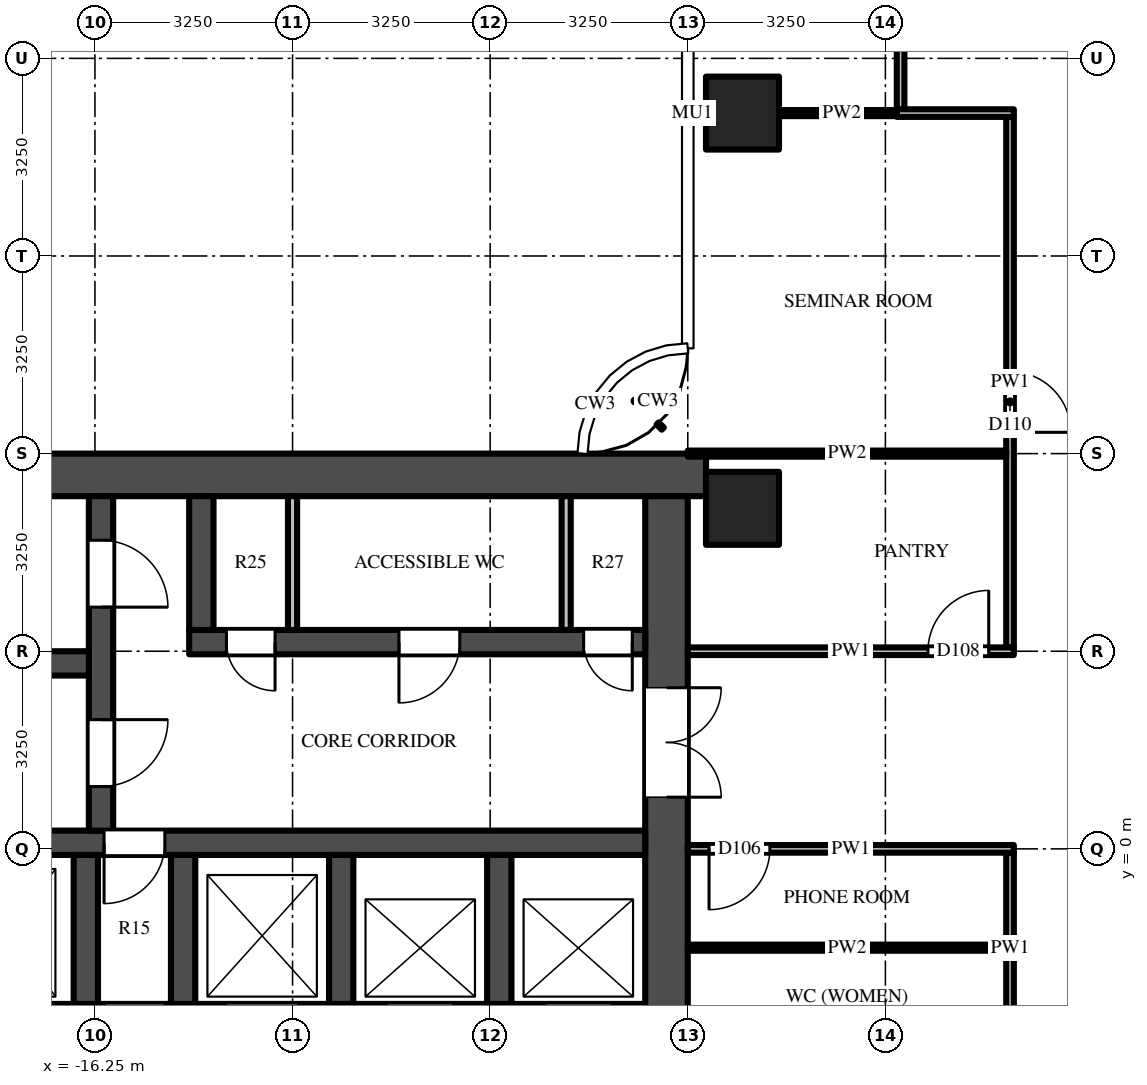
"""IFC4 building model, lengths in metres.
Left out: names, types, materials, properties, quantities, classifications, styles, units other than length and angle.
Written with IfcOpenShell. Run it as: python <this file> out.ifc"""

import sys

from ifc_helpers import new_model, si_unit, direction, frame, frame_2d, origin, origin_2d, place, context, subcontext, project, spatial, rectangle, extrude, source, transform, mapped, element, fill, save


model = new_model("IFC4")
c1 = context("Model", 3, precision=1e-05, world=origin(), true_north=direction((0.0, 1.0)))
c2 = subcontext(c1, "Body", "Model", "MODEL_VIEW")
j1 = project(units=[si_unit("LENGTHUNIT", "METRE"), si_unit("PLANEANGLEUNIT", "RADIAN")], contexts=[c1])
p1 = place(None, origin())
s1 = spatial("IfcSite", under=j1, at=p1, CompositionType="ELEMENT")
p2 = place(p1, origin())
s2 = spatial("IfcBuilding", under=s1, at=p2, CompositionType="ELEMENT")
p3 = place(p2, frame((0.0, 0.0, 204.9)))
s3 = spatial("IfcBuildingStorey", under=s2, at=p3, CompositionType="ELEMENT", Elevation=204.9)
m1 = source(origin(), c2, "Body", "SweptSolid", [
    extrude(rectangle(XDim=1.2, YDim=1.2, at=origin_2d()), origin(), (0.0, 0.0, 1.0), 3.9),
])
for number, where, z_axis, x_axis in (
    (1, (-5.6, 12.1, 0.0), (0.0, 0.0, 1.0), (1.0, 0.0, 0.0)),
    (2, (-5.6, 5.6, 0.0), (0.0, 0.0, 1.0), (1.0, 0.0, 0.0)),
):
    element("IfcColumn", number, at=place(p3, frame(where, z_axis=z_axis, x_axis=x_axis)), inside=s3, PredefinedType="COLUMN", context=c2, shape_type="MappedRepresentation", body=[
        mapped(m1, transform((0.0, 0.0, 0.0))),
    ])
m2 = source(origin(), c2, "Body", "SweptSolid", [
    extrude(rectangle(XDim=16.55, YDim=0.7, at=frame_2d((8.275, 0.0))), origin(), (0.0, 0.0, 1.0), 3.7),
])
p4 = place(p3, frame((-6.2, 6.15, 0.0), z_axis=(0.0, 0.0, 1.0), x_axis=(-1.0, 0.0, 0.0)))
e3 = element("IfcWall", 3, at=p4, inside=s3, PredefinedType="SHEAR", context=c2, shape_type="MappedRepresentation", body=[
    mapped(m2, transform((0.0, 0.0, 0.0))),
])
m3 = source(origin(), c2, "Body", "SweptSolid", [
    extrude(rectangle(XDim=14.85, YDim=0.7, at=frame_2d((7.425, 0.0))), origin(), (0.0, 0.0, 1.0), 3.7),
])
p5 = place(p3, frame((-7.2, -2.9, 0.0), z_axis=(0.0, 0.0, 1.0), x_axis=(-1.0, 0.0, 0.0)))
e4 = element("IfcWall", 4, at=p5, inside=s3, PredefinedType="SHEAR", context=c2, shape_type="MappedRepresentation", body=[
    mapped(m3, transform((0.0, 0.0, 0.0))),
])
m4 = source(origin(), c2, "Body", "SweptSolid", [
    extrude(rectangle(XDim=1.1, YDim=2.1, at=frame_2d((0.55, 1.05))), frame((0.0, 0.36, 0.0), z_axis=(0.0, -1.0, 0.0), x_axis=(1.0, 0.0, 0.0)), (0.0, 0.0, 1.0), 0.72),
])
p6 = place(p5, frame((0.55, 0.0, 0.0)))
e5 = element("IfcOpeningElement", 5, at=p6, cuts=e4, PredefinedType="OPENING", context=c2, shape_type="MappedRepresentation", body=[
    mapped(m4, transform((0.0, 0.0, 0.0))),
])
p7 = place(p5, frame((3.15, 0.0, 0.0)))
e6 = element("IfcOpeningElement", 6, at=p7, cuts=e4, PredefinedType="OPENING", context=c2, shape_type="MappedRepresentation", body=[
    mapped(m4, transform((0.0, 0.0, 0.0))),
])
m5 = source(origin(), c2, "Body", "SweptSolid", [
    extrude(rectangle(XDim=1.2, YDim=2.1, at=frame_2d((0.6, 1.05))), frame((0.0, 0.36, 0.0), z_axis=(0.0, -1.0, 0.0), x_axis=(1.0, 0.0, 0.0)), (0.0, 0.0, 1.0), 0.72),
])
p8 = place(p5, frame((5.7, 0.0, 0.0)))
e7 = element("IfcOpeningElement", 7, at=p8, cuts=e4, PredefinedType="OPENING", context=c2, shape_type="MappedRepresentation", body=[
    mapped(m5, transform((0.0, 0.0, 0.0))),
])
m6 = source(origin(), c2, "Body", "SweptSolid", [
    extrude(rectangle(XDim=1.3, YDim=2.1, at=frame_2d((0.65, 1.05))), frame((0.0, 0.36, 0.0), z_axis=(0.0, -1.0, 0.0), x_axis=(1.0, 0.0, 0.0)), (0.0, 0.0, 1.0), 0.72),
])
p9 = place(p5, frame((12.2, 0.0, 0.0)))
e8 = element("IfcOpeningElement", 8, at=p9, cuts=e4, PredefinedType="OPENING", context=c2, shape_type="MappedRepresentation", body=[
    mapped(m6, transform((0.0, 0.0, 0.0))),
])
p10 = place(p5, frame((9.85, 0.0, 0.0)))
e9 = element("IfcOpeningElement", 9, at=p10, cuts=e4, PredefinedType="OPENING", context=c2, shape_type="MappedRepresentation", body=[
    mapped(m5, transform((0.0, 0.0, 0.0))),
])
m7 = source(origin(), c2, "Body", "SweptSolid", [
    extrude(rectangle(XDim=1.0, YDim=2.1, at=frame_2d((0.5, 1.05))), frame((0.0, 0.36, 0.0), z_axis=(0.0, -1.0, 0.0), x_axis=(1.0, 0.0, 0.0)), (0.0, 0.0, 1.0), 0.72),
])
p11 = place(p5, frame((7.9, 0.0, 0.0)))
e10 = element("IfcOpeningElement", 10, at=p11, cuts=e4, PredefinedType="OPENING", context=c2, shape_type="MappedRepresentation", body=[
    mapped(m7, transform((0.0, 0.0, 0.0))),
])
m8 = source(origin(), c2, "Body", "SweptSolid", [
    extrude(rectangle(XDim=9.05, YDim=0.7, at=frame_2d((4.525, 0.0))), origin(), (0.0, 0.0, 1.0), 3.7),
])
p12 = place(p3, frame((-6.85, 5.8, 0.0), z_axis=(0.0, 0.0, 1.0), x_axis=(0.0, -1.0, 0.0)))
e11 = element("IfcWall", 11, at=p12, inside=s3, PredefinedType="SHEAR", context=c2, shape_type="MappedRepresentation", body=[
    mapped(m8, transform((0.0, 0.0, 0.0))),
])
m9 = source(origin(), c2, "Body", "SweptSolid", [
    extrude(rectangle(XDim=1.8, YDim=2.1, at=frame_2d((0.9, 1.05))), frame((0.0, 0.36, 0.0), z_axis=(0.0, -1.0, 0.0), x_axis=(1.0, 0.0, 0.0)), (0.0, 0.0, 1.0), 0.72),
])
p13 = place(p12, frame((3.15, 0.0, 0.0)))
e12 = element("IfcOpeningElement", 12, at=p13, cuts=e11, PredefinedType="OPENING", context=c2, shape_type="MappedRepresentation", body=[
    mapped(m9, transform((0.0, 0.0, 0.0))),
])
m10 = source(origin(), c2, "Body", "SweptSolid", [
    extrude(rectangle(XDim=7.5, YDim=0.4, at=frame_2d((3.75, 0.0))), origin(), (0.0, 0.0, 1.0), 3.7),
])
p14 = place(p3, frame((-7.2, 3.4, 0.0), z_axis=(0.0, 0.0, 1.0), x_axis=(-1.0, 0.0, 0.0)))
e13 = element("IfcWall", 13, at=p14, inside=s3, PredefinedType="SHEAR", context=c2, shape_type="MappedRepresentation", body=[
    mapped(m10, transform((0.0, 0.0, 0.0))),
])
m11 = source(origin(), c2, "Body", "SweptSolid", [
    extrude(rectangle(XDim=0.8, YDim=2.1, at=frame_2d((0.4, 1.05))), frame((0.0, 0.21, 0.0), z_axis=(0.0, -1.0, 0.0), x_axis=(1.0, 0.0, 0.0)), (0.0, 0.0, 1.0), 0.42),
])
p15 = place(p14, frame((0.212, 0.0, 0.0)))
e14 = element("IfcOpeningElement", 14, at=p15, cuts=e13, PredefinedType="OPENING", context=c2, shape_type="MappedRepresentation", body=[
    mapped(m11, transform((0.0, 0.0, 0.0))),
])
m12 = source(origin(), c2, "Body", "SweptSolid", [
    extrude(rectangle(XDim=1.0, YDim=2.1, at=frame_2d((0.5, 1.05))), frame((0.0, 0.21, 0.0), z_axis=(0.0, -1.0, 0.0), x_axis=(1.0, 0.0, 0.0)), (0.0, 0.0, 1.0), 0.42),
])
p16 = place(p14, frame((3.05, 0.0, 0.0)))
e15 = element("IfcOpeningElement", 15, at=p16, cuts=e13, PredefinedType="OPENING", context=c2, shape_type="MappedRepresentation", body=[
    mapped(m12, transform((0.0, 0.0, 0.0))),
])
p17 = place(p14, frame((6.087, 0.0, 0.0)))
e16 = element("IfcOpeningElement", 16, at=p17, cuts=e13, PredefinedType="OPENING", context=c2, shape_type="MappedRepresentation", body=[
    mapped(m11, transform((0.0, 0.0, 0.0))),
])
m13 = source(origin(), c2, "Body", "SweptSolid", [
    extrude(rectangle(XDim=14.85, YDim=0.4, at=frame_2d((7.425, 0.0))), origin(), (0.0, 0.0, 1.0), 3.7),
])
p18 = place(p3, frame((-7.2, 0.1, 0.0), z_axis=(0.0, 0.0, 1.0), x_axis=(-1.0, 0.0, 0.0)))
e17 = element("IfcWall", 17, at=p18, inside=s3, PredefinedType="SHEAR", context=c2, shape_type="MappedRepresentation", body=[
    mapped(m13, transform((0.0, 0.0, 0.0))),
])
p19 = place(p18, frame((7.9, 0.0, 0.0)))
e18 = element("IfcOpeningElement", 18, at=p19, cuts=e17, PredefinedType="OPENING", context=c2, shape_type="MappedRepresentation", body=[
    mapped(m12, transform((0.0, 0.0, 0.0))),
])
m14 = source(origin(), c2, "Body", "SweptSolid", [
    extrude(rectangle(XDim=5.5, YDim=0.4, at=frame_2d((2.75, 0.0))), origin(), (0.0, 0.0, 1.0), 3.7),
])
p20 = place(p3, frame((-16.15, 5.8, 0.0), z_axis=(0.0, 0.0, 1.0), x_axis=(0.0, -1.0, 0.0)))
e19 = element("IfcWall", 19, at=p20, inside=s3, PredefinedType="SHEAR", context=c2, shape_type="MappedRepresentation", body=[
    mapped(m14, transform((0.0, 0.0, 0.0))),
])
m15 = source(origin(), c2, "Body", "SweptSolid", [
    extrude(rectangle(XDim=1.1, YDim=2.1, at=frame_2d((0.55, 1.05))), frame((0.0, 0.21, 0.0), z_axis=(0.0, -1.0, 0.0), x_axis=(1.0, 0.0, 0.0)), (0.0, 0.0, 1.0), 0.42),
])
p21 = place(p20, frame((0.725, 0.0, 0.0)))
e20 = element("IfcOpeningElement", 20, at=p21, cuts=e19, PredefinedType="OPENING", context=c2, shape_type="MappedRepresentation", body=[
    mapped(m15, transform((0.0, 0.0, 0.0))),
])
p22 = place(p20, frame((3.675, 0.0, 0.0)))
e21 = element("IfcOpeningElement", 21, at=p22, cuts=e19, PredefinedType="OPENING", context=c2, shape_type="MappedRepresentation", body=[
    mapped(m15, transform((0.0, 0.0, 0.0))),
])
m16 = source(origin(), c2, "Body", "SweptSolid", [
    extrude(rectangle(XDim=5.7, YDim=0.4, at=frame_2d((2.85, 0.0))), origin(), (0.0, 0.0, 1.0), 3.7),
])
p23 = place(p3, frame((-16.35, 3.05, 0.0), z_axis=(0.0, 0.0, 1.0), x_axis=(-1.0, 0.0, 0.0)))
e22 = element("IfcWall", 22, at=p23, inside=s3, PredefinedType="SHEAR", context=c2, shape_type="MappedRepresentation", body=[
    mapped(m16, transform((0.0, 0.0, 0.0))),
])
m17 = source(origin(), c2, "Body", "SweptSolid", [
    extrude(rectangle(XDim=2.2, YDim=0.4, at=frame_2d((1.1, 0.0))), origin(), (0.0, 0.0, 1.0), 3.7),
])
p24 = place(p3, frame((-14.5, 5.8, 0.0), z_axis=(0.0, 0.0, 1.0), x_axis=(0.0, -1.0, 0.0)))
e23 = element("IfcWall", 23, at=p24, inside=s3, PredefinedType="SHEAR", context=c2, shape_type="MappedRepresentation", body=[
    mapped(m17, transform((0.0, 0.0, 0.0))),
])
m18 = source(origin(), c2, "Body", "SweptSolid", [
    extrude(rectangle(XDim=2.45, YDim=0.4, at=frame_2d((1.225, 0.0))), origin(), (0.0, 0.0, 1.0), 3.7),
])
for number, where, z_axis, x_axis in (
    (24, (-9.6, -0.1, 0.0), (0.0, 0.0, 1.0), (0.0, -1.0, 0.0)),
    (25, (-12.2, -0.1, 0.0), (0.0, 0.0, 1.0), (0.0, -1.0, 0.0)),
    (26, (-14.8, -0.1, 0.0), (0.0, 0.0, 1.0), (0.0, -1.0, 0.0)),
    (27, (-16.4, -0.1, 0.0), (0.0, 0.0, 1.0), (0.0, -1.0, 0.0)),
):
    element("IfcWall", number, at=place(p3, frame(where, z_axis=z_axis, x_axis=x_axis)), inside=s3, PredefinedType="SHEAR", context=c2, shape_type="MappedRepresentation", body=[
        mapped(m18, transform((0.0, 0.0, 0.0))),
    ])
m19 = source(origin(), c2, "Body", "SweptSolid", [
    extrude(rectangle(XDim=2.2, YDim=0.15, at=frame_2d((1.1, 0.0))), origin(), (0.0, 0.0, 1.0), 3.7),
])
for number, where, z_axis, x_axis in (
    (28, (-8.5, 5.8, 0.0), (0.0, 0.0, 1.0), (0.0, -1.0, 0.0)),
    (29, (-13.0, 5.8, 0.0), (0.0, 0.0, 1.0), (0.0, -1.0, 0.0)),
):
    element("IfcWall", number, at=place(p3, frame(where, z_axis=z_axis, x_axis=x_axis)), inside=s3, PredefinedType="PARTITIONING", context=c2, shape_type="MappedRepresentation", body=[
        mapped(m19, transform((0.0, 0.0, 0.0))),
    ])
m20 = source(origin(), c2, "Body", "SweptSolid", [
    extrude(rectangle(XDim=8.788, YDim=0.125, at=frame_2d((4.394, 0.0))), origin(), (0.0, 0.0, 1.0), 2.78),
])
p25 = place(p3, frame((-3.0, 12.15, 0.0), z_axis=(0.0, 0.0, 1.0), x_axis=(0.0, 1.0, 0.0)))
e30 = element("IfcWall", 30, at=p25, inside=s3, PredefinedType="PARTITIONING", context=c2, shape_type="MappedRepresentation", body=[
    mapped(m20, transform((0.0, 0.0, 0.0))),
])
m21 = source(origin(), c2, "Body", "SweptSolid", [
    extrude(rectangle(XDim=1.8, YDim=2.1, at=frame_2d((0.9, 1.05))), frame((0.0, 0.073, 0.0), z_axis=(0.0, -1.0, 0.0), x_axis=(1.0, 0.0, 0.0)), (0.0, 0.0, 1.0), 0.145),
])
p26 = place(p25, frame((5.2, 0.0, 0.0)))
e31 = element("IfcOpeningElement", 31, at=p26, cuts=e30, PredefinedType="OPENING", context=c2, shape_type="MappedRepresentation", body=[
    mapped(m21, transform((0.0, 0.0, 0.0))),
])
m22 = source(origin(), c2, "Body", "SweptSolid", [
    extrude(rectangle(XDim=3.125, YDim=0.125, at=frame_2d((1.562, 0.0))), origin(), (0.0, 0.0, 1.0), 3.068),
])
p27 = place(p3, frame((-1.2, -0.062, 0.0), z_axis=(0.0, 0.0, 1.0), x_axis=(0.0, -1.0, 0.0)))
e32 = element("IfcWall", 32, at=p27, inside=s3, PredefinedType="PARTITIONING", context=c2, shape_type="MappedRepresentation", body=[
    mapped(m22, transform((0.0, 0.0, 0.0))),
])
m23 = source(origin(), c2, "Body", "SweptSolid", [
    extrude(rectangle(XDim=8.725, YDim=0.125, at=frame_2d((4.363, 0.0))), origin(), (0.0, 0.0, 1.0), 2.997),
])
p28 = place(p3, frame((-1.2, 12.038, 0.0), z_axis=(0.0, 0.0, 1.0), x_axis=(0.0, -1.0, 0.0)))
e33 = element("IfcWall", 33, at=p28, inside=s3, PredefinedType="PARTITIONING", context=c2, shape_type="MappedRepresentation", body=[
    mapped(m23, transform((0.0, 0.0, 0.0))),
])
m24 = source(origin(), c2, "Body", "SweptSolid", [
    extrude(rectangle(XDim=1.0, YDim=2.1, at=frame_2d((0.5, 1.05))), frame((0.0, 0.073, 0.0), z_axis=(0.0, -1.0, 0.0), x_axis=(1.0, 0.0, 0.0)), (0.0, 0.0, 1.0), 0.145),
])
p29 = place(p28, frame((4.188, 0.0, 0.0)))
e34 = element("IfcOpeningElement", 34, at=p29, cuts=e33, PredefinedType="OPENING", context=c2, shape_type="MappedRepresentation", body=[
    mapped(m24, transform((0.0, 0.0, 0.0))),
])
m25 = source(origin(), c2, "Body", "SweptSolid", [
    extrude(rectangle(XDim=5.238, YDim=0.1, at=frame_2d((2.619, 0.0))), origin(), (0.0, 0.0, 1.0), 2.997),
])
p30 = place(p3, frame((-6.5, -1.625, 0.0), z_axis=(0.0, 0.0, 1.0), x_axis=(1.0, 0.0, 0.0)))
e35 = element("IfcWall", 35, at=p30, inside=s3, PredefinedType="PARTITIONING", context=c2, shape_type="MappedRepresentation", body=[
    mapped(m25, transform((0.0, 0.0, 0.0))),
])
m26 = source(origin(), c2, "Body", "SweptSolid", [
    extrude(rectangle(XDim=5.363, YDim=0.125, at=frame_2d((2.681, 0.0))), origin(), (0.0, 0.0, 1.0), 2.997),
])
p31 = place(p3, frame((-1.137, 0.0, 0.0), z_axis=(0.0, 0.0, 1.0), x_axis=(-1.0, 0.0, 0.0)))
e36 = element("IfcWall", 36, at=p31, inside=s3, PredefinedType="PARTITIONING", context=c2, shape_type="MappedRepresentation", body=[
    mapped(m26, transform((0.0, 0.0, 0.0))),
])
p32 = place(p31, frame((4.012, 0.0, 0.0)))
e37 = element("IfcOpeningElement", 37, at=p32, cuts=e36, PredefinedType="OPENING", context=c2, shape_type="MappedRepresentation", body=[
    mapped(m24, transform((0.0, 0.0, 0.0))),
])
p33 = place(p3, frame((-6.5, 3.25, 0.0), z_axis=(0.0, 0.0, 1.0), x_axis=(1.0, 0.0, 0.0)))
e38 = element("IfcWall", 38, at=p33, inside=s3, PredefinedType="PARTITIONING", context=c2, shape_type="MappedRepresentation", body=[
    mapped(m26, transform((0.0, 0.0, 0.0))),
])
p34 = place(p33, frame((3.95, 0.0, 0.0)))
e39 = element("IfcOpeningElement", 39, at=p34, cuts=e38, PredefinedType="OPENING", context=c2, shape_type="MappedRepresentation", body=[
    mapped(m24, transform((0.0, 0.0, 0.0))),
])
m27 = source(origin(), c2, "Body", "SweptSolid", [
    extrude(rectangle(XDim=5.238, YDim=0.1, at=frame_2d((2.619, 0.0))), origin(), (0.0, 0.0, 1.0), 2.78),
])
p35 = place(p3, frame((-6.5, 6.5, 0.0), z_axis=(0.0, 0.0, 1.0), x_axis=(1.0, 0.0, 0.0)))
e40 = element("IfcWall", 40, at=p35, inside=s3, PredefinedType="PARTITIONING", context=c2, shape_type="MappedRepresentation", body=[
    mapped(m27, transform((0.0, 0.0, 0.0))),
])
m28 = source(origin(), c2, "Body", "SweptSolid", [
    extrude(rectangle(XDim=2.062, YDim=0.1, at=frame_2d((1.031, 0.0))), origin(), (0.0, 0.0, 1.0), 2.997),
])
p36 = place(p3, frame((-5.0, 12.1, 0.0), z_axis=(0.0, 0.0, 1.0), x_axis=(1.0, 0.0, 0.0)))
e41 = element("IfcWall", 41, at=p36, inside=s3, PredefinedType="PARTITIONING", context=c2, shape_type="MappedRepresentation", body=[
    mapped(m28, transform((0.0, 0.0, 0.0))),
])
m29 = source(origin(), c2, "Body", "SweptSolid", [
    extrude(rectangle(XDim=1.925, YDim=0.125, at=frame_2d((0.962, 0.0))), origin(), (0.0, 0.0, 1.0), 2.997),
])
p37 = place(p3, frame((-1.137, 12.1, 0.0), z_axis=(0.0, 0.0, 1.0), x_axis=(-1.0, 0.0, 0.0)))
e42 = element("IfcWall", 42, at=p37, inside=s3, PredefinedType="PARTITIONING", context=c2, shape_type="MappedRepresentation", body=[
    mapped(m29, transform((0.0, 0.0, 0.0))),
])
m30 = source(origin(), c2, "Body", "SweptSolid", [
    extrude(rectangle(XDim=1.8, YDim=2.1, at=frame_2d((0.9, 1.05))), frame((0.0, -0.275, 0.0), z_axis=(0.0, -1.0, 0.0), x_axis=(1.0, 0.0, 0.0)), (0.0, 0.0, 1.0), 0.05),
])
p38 = place(p13, origin())
e43 = element("IfcDoor", 43, at=p38, inside=s3, OperationType="DOUBLE_DOOR_SINGLE_SWING", PredefinedType="DOOR", context=c2, shape_type="MappedRepresentation", body=[
    mapped(m30, transform((0.0, 0.0, 0.0))),
])
fill(e12, e43)
m31 = source(origin(), c2, "Body", "SweptSolid", [
    extrude(rectangle(XDim=1.1, YDim=2.1, at=frame_2d((0.55, 1.05))), frame((0.0, 0.025, 0.0), z_axis=(0.0, -1.0, 0.0), x_axis=(1.0, 0.0, 0.0)), (0.0, 0.0, 1.0), 0.05),
])
p39 = place(p21, origin())
e44 = element("IfcDoor", 44, at=p39, inside=s3, OperationType="SINGLE_SWING_RIGHT", PredefinedType="DOOR", context=c2, shape_type="MappedRepresentation", body=[
    mapped(m31, transform((0.0, 0.0, 0.0))),
])
fill(e20, e44)
p40 = place(p22, origin())
e45 = element("IfcDoor", 45, at=p40, inside=s3, OperationType="SINGLE_SWING_LEFT", PredefinedType="DOOR", context=c2, shape_type="MappedRepresentation", body=[
    mapped(m31, transform((0.0, 0.0, 0.0))),
])
fill(e21, e45)
m32 = source(origin(), c2, "Body", "SweptSolid", [
    extrude(rectangle(XDim=1.0, YDim=2.1, at=frame_2d((0.5, 1.05))), frame((0.0, 0.025, 0.0), z_axis=(0.0, -1.0, 0.0), x_axis=(1.0, 0.0, 0.0)), (0.0, 0.0, 1.0), 0.05),
])
p41 = place(p19, origin())
e46 = element("IfcDoor", 46, at=p41, inside=s3, OperationType="SINGLE_SWING_RIGHT", PredefinedType="DOOR", context=c2, shape_type="MappedRepresentation", body=[
    mapped(m32, transform((0.0, 0.0, 0.0))),
])
fill(e18, e46)
m33 = source(origin(), c2, "Body", "SweptSolid", [
    extrude(rectangle(XDim=0.8, YDim=2.1, at=frame_2d((0.4, 1.05))), frame((0.0, 0.025, 0.0), z_axis=(0.0, -1.0, 0.0), x_axis=(1.0, 0.0, 0.0)), (0.0, 0.0, 1.0), 0.05),
])
p42 = place(p15, origin())
e47 = element("IfcDoor", 47, at=p42, inside=s3, OperationType="SINGLE_SWING_LEFT", PredefinedType="DOOR", context=c2, shape_type="MappedRepresentation", body=[
    mapped(m33, transform((0.0, 0.0, 0.0))),
])
fill(e14, e47)
p43 = place(p16, origin())
e48 = element("IfcDoor", 48, at=p43, inside=s3, OperationType="SINGLE_SWING_RIGHT", PredefinedType="DOOR", context=c2, shape_type="MappedRepresentation", body=[
    mapped(m32, transform((0.0, 0.0, 0.0))),
])
fill(e15, e48)
p44 = place(p17, origin())
e49 = element("IfcDoor", 49, at=p44, inside=s3, OperationType="SINGLE_SWING_LEFT", PredefinedType="DOOR", context=c2, shape_type="MappedRepresentation", body=[
    mapped(m33, transform((0.0, 0.0, 0.0))),
])
fill(e16, e49)
p45 = place(p32, origin())
e50 = element("IfcDoor", 50, at=p45, inside=s3, OperationType="SINGLE_SWING_RIGHT", PredefinedType="DOOR", context=c2, shape_type="MappedRepresentation", body=[
    mapped(m32, transform((0.0, 0.0, 0.0))),
])
fill(e37, e50)
p46 = place(p34, origin())
e51 = element("IfcDoor", 51, at=p46, inside=s3, OperationType="SINGLE_SWING_RIGHT", PredefinedType="DOOR", context=c2, shape_type="MappedRepresentation", body=[
    mapped(m32, transform((0.0, 0.0, 0.0))),
])
fill(e39, e51)
p47 = place(p29, origin())
e52 = element("IfcDoor", 52, at=p47, inside=s3, OperationType="SINGLE_SWING_RIGHT", PredefinedType="DOOR", context=c2, shape_type="MappedRepresentation", body=[
    mapped(m32, transform((0.0, 0.0, 0.0))),
])
fill(e34, e52)
save(model, sys.argv[1])
